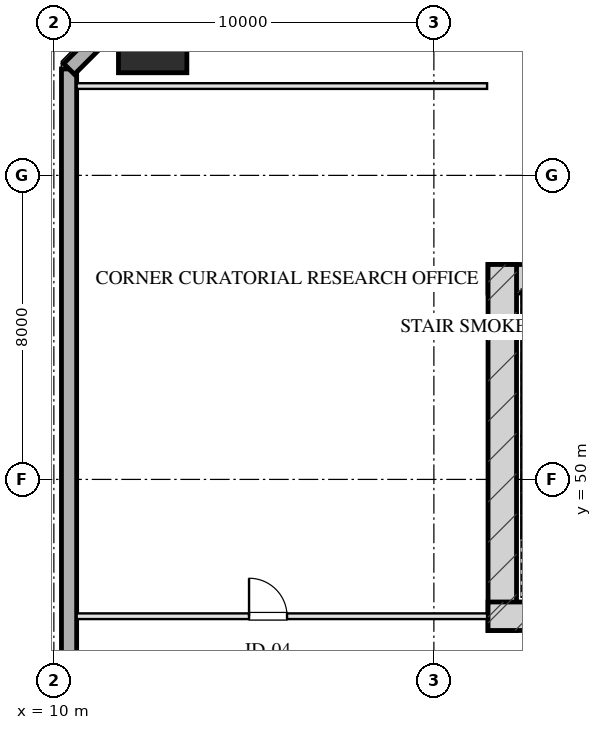
"""IFC4 building model, lengths in metres.
Left out: names, types, materials, properties, quantities, classifications, styles, units other than length and angle.
Written with IfcOpenShell. Run it as: python <this file> out.ifc"""

import sys

from ifc_helpers import new_model, si_unit, direction, frame, frame_2d, origin, origin_2d, place, context, subcontext, project, spatial, rectangle, hollow_rectangle, extrude, element, fill, save


model = new_model("IFC4")
c1 = context("Model", 3, precision=1e-05, world=origin(), true_north=direction((0.0, 1.0)))
c2 = subcontext(c1, "Body", "Model", "MODEL_VIEW")
j1 = project(units=[si_unit("LENGTHUNIT", "METRE"), si_unit("PLANEANGLEUNIT", "RADIAN")], contexts=[c1])
p1 = place(None, origin())
s1 = spatial("IfcSite", under=j1, at=p1, CompositionType="ELEMENT")
p2 = place(p1, origin())
s2 = spatial("IfcBuilding", under=s1, at=p2, CompositionType="ELEMENT")
p3 = place(p2, frame((0.0, 0.0, 50.6)))
s3 = spatial("IfcBuildingStorey", under=s2, at=p3, CompositionType="ELEMENT", Elevation=50.6)
p4 = place(p3, frame((21.425, 55.28, 0.0), z_axis=(0.0, 0.0, 1.0), x_axis=(1.0, 0.0, 0.0)))
e1 = element("IfcWall", 1, at=p4, inside=s3, PredefinedType="SHEAR", context=c2, shape_type="SweptSolid", body=[
    extrude(rectangle(XDim=17.15, YDim=0.75, at=frame_2d((8.575, 0.0))), origin(), (0.0, 0.0, 1.0), 3.45),
])
p5 = place(p3, frame((21.8, 46.025, 0.0), z_axis=(0.0, 0.0, 1.0), x_axis=(0.0, 1.0, 0.0)))
e2 = element("IfcWall", 2, at=p5, inside=s3, PredefinedType="SHEAR", context=c2, shape_type="SweptSolid", body=[
    extrude(rectangle(XDim=9.63, YDim=0.75, at=frame_2d((4.815, 0.0))), origin(), (0.0, 0.0, 1.0), 3.45),
])
p6 = place(p3, frame((21.425, 46.4, 0.0), z_axis=(0.0, 0.0, 1.0), x_axis=(1.0, 0.0, 0.0)))
e3 = element("IfcWall", 3, at=p6, inside=s3, PredefinedType="SHEAR", context=c2, shape_type="SweptSolid", body=[
    extrude(rectangle(XDim=4.295, YDim=0.75, at=frame_2d((2.147, 0.0))), origin(), (0.0, 0.0, 1.0), 3.45),
])
p7 = place(p3, frame((12.6, 61.6, 0.0), z_axis=(0.0, 0.0, 1.0), x_axis=(1.0, 0.0, 0.0)))
e4 = element("IfcColumn", 4, at=p7, inside=s3, PredefinedType="COLUMN", context=c2, shape_type="SweptSolid", body=[
    extrude(hollow_rectangle(XDim=1.8, YDim=1.8, WallThickness=0.06, at=origin_2d()), origin(), (0.0, 0.0, 1.0), 3.451),
])
p8 = place(p3, frame((10.4, 7.2, 0.0), z_axis=(0.0, 0.0, 1.0), x_axis=(0.0, 1.0, 0.0)))
e5 = element("IfcWall", 5, at=p8, inside=s3, PredefinedType="SOLIDWALL", context=c2, shape_type="SweptSolid", body=[
    extrude(rectangle(XDim=53.6, YDim=0.4, at=frame_2d((26.8, 0.0))), origin(), (0.0, 0.0, 1.0), 2.61),
])
p9 = place(p8, frame((29.35, 0.0, 0.0)))
e6 = element("IfcOpeningElement", 6, at=p9, cuts=e5, PredefinedType="OPENING", context=c2, shape_type="SweptSolid", body=[
    extrude(rectangle(XDim=1.1, YDim=2.15, at=frame_2d((0.55, 1.075))), frame((0.0, 0.21, 0.0), z_axis=(0.0, -1.0, 0.0), x_axis=(1.0, 0.0, 0.0)), (0.0, 0.0, 1.0), 0.42),
])
p10 = place(p3, frame((10.4, 60.8, 0.0), z_axis=(0.0, 0.0, 1.0), x_axis=(0.707106781187, 0.707106781187, 0.0)))
e7 = element("IfcWall", 7, at=p10, inside=s3, PredefinedType="SOLIDWALL", context=c2, shape_type="SweptSolid", body=[
    extrude(rectangle(XDim=4.243, YDim=0.4, at=frame_2d((2.121, 0.0))), origin(), (0.0, 0.0, 1.0), 2.61),
])
p11 = place(p3, frame((10.6, 60.35, 0.0), z_axis=(0.0, 0.0, 1.0), x_axis=(1.0, 0.0, 0.0)))
e8 = element("IfcWall", 8, at=p11, inside=s3, PredefinedType="PARTITIONING", context=c2, shape_type="SweptSolid", body=[
    extrude(rectangle(XDim=10.8, YDim=0.15, at=frame_2d((5.4, 0.0))), origin(), (0.0, 0.0, 1.0), 3.175),
])
p12 = place(p3, frame((10.6, 46.4, 0.0), z_axis=(0.0, 0.0, 1.0), x_axis=(1.0, 0.0, 0.0)))
e9 = element("IfcWall", 9, at=p12, inside=s3, PredefinedType="PARTITIONING", context=c2, shape_type="SweptSolid", body=[
    extrude(rectangle(XDim=10.8, YDim=0.15, at=frame_2d((5.4, 0.0))), origin(), (0.0, 0.0, 1.0), 3.175),
])
p13 = place(p12, frame((4.536, 0.0, 0.0)))
e10 = element("IfcOpeningElement", 10, at=p13, cuts=e9, PredefinedType="OPENING", context=c2, shape_type="SweptSolid", body=[
    extrude(rectangle(XDim=1.0, YDim=2.05, at=frame_2d((0.5, 1.025))), frame((0.0, 0.085, 0.0), z_axis=(0.0, -1.0, 0.0), x_axis=(1.0, 0.0, 0.0)), (0.0, 0.0, 1.0), 0.17),
])
p14 = place(p13, origin())
e11 = element("IfcDoor", 11, at=p14, inside=s3, OperationType="SINGLE_SWING_LEFT", PredefinedType="DOOR", context=c2, shape_type="SweptSolid", body=[
    extrude(rectangle(XDim=1.0, YDim=2.05, at=frame_2d((0.5, 1.025))), frame((0.0, 0.025, 0.0), z_axis=(0.0, -1.0, 0.0), x_axis=(1.0, 0.0, 0.0)), (0.0, 0.0, 1.0), 0.05),
])
fill(e10, e11)
save(model, sys.argv[1])
